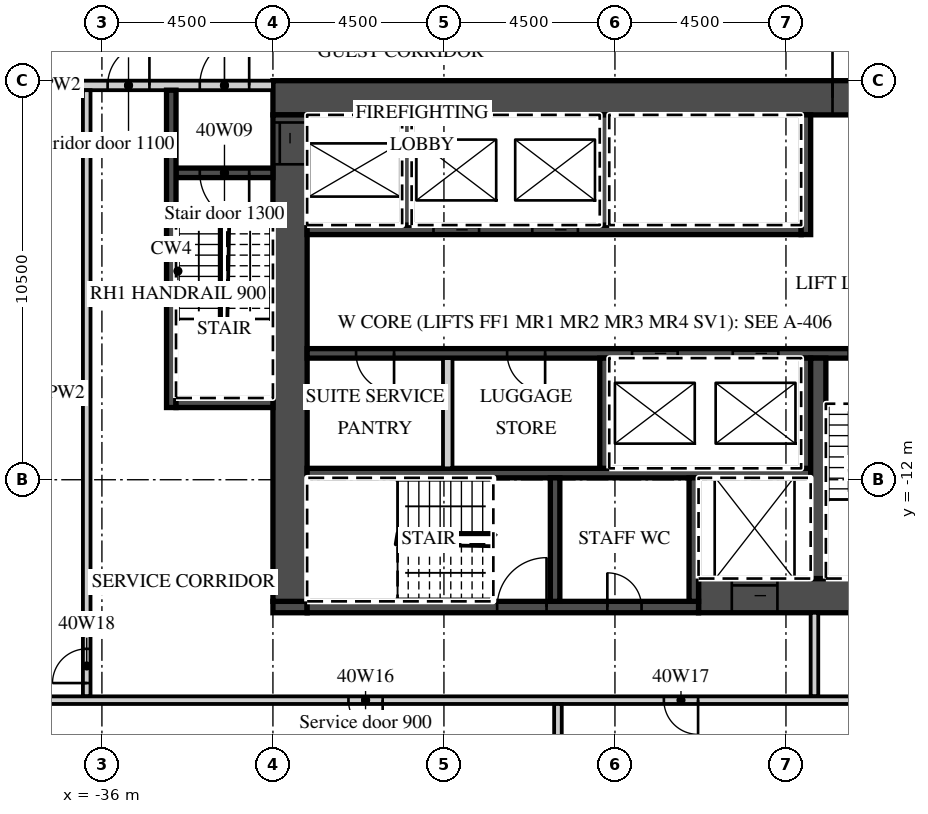
"""IFC4 building model, lengths in metres.
Left out: names, types, materials, properties, quantities, classifications, styles, units other than length and angle.
Written with IfcOpenShell. Run it as: python <this file> out.ifc"""

import sys

from ifc_helpers import new_model, si_unit, direction, frame, frame_2d, origin, place, context, subcontext, project, spatial, rectangle, extrude, element, fill, save


model = new_model("IFC4")
c1 = context("Model", 3, precision=1e-05, world=origin(), true_north=direction((0.0, 1.0)))
c2 = subcontext(c1, "Body", "Model", "MODEL_VIEW")
j1 = project(units=[si_unit("LENGTHUNIT", "METRE"), si_unit("PLANEANGLEUNIT", "RADIAN")], contexts=[c1])
p1 = place(None, origin())
s1 = spatial("IfcSite", under=j1, at=p1, CompositionType="ELEMENT")
p2 = place(p1, origin())
s2 = spatial("IfcBuilding", under=s1, at=p2, CompositionType="ELEMENT")
p3 = place(p2, frame((0.0, 0.0, 173.5)))
s3 = spatial("IfcBuildingStorey", under=s2, at=p3, CompositionType="ELEMENT", Elevation=173.5)
p4 = place(p3, frame((-31.5, -1.95, 0.0), z_axis=(0.0, 0.0, 1.0), x_axis=(1.0, 0.0, 0.0)))
e1 = element("IfcWall", 1, at=p4, inside=s3, PredefinedType="SHEAR", context=c2, shape_type="SweptSolid", body=[
    extrude(rectangle(XDim=18.0, YDim=0.9, at=frame_2d((9.0, 0.0))), origin(), (0.0, 0.0, 1.0), 3.02),
])
p5 = place(p4, frame((14.725, 0.0, 0.0)))
e2 = element("IfcOpeningElement", 2, at=p5, cuts=e1, PredefinedType="OPENING", context=c2, shape_type="SweptSolid", body=[
    extrude(rectangle(XDim=1.8, YDim=2.1, at=frame_2d((0.9, 1.05))), frame((0.0, 0.46, 0.0), z_axis=(0.0, -1.0, 0.0), x_axis=(1.0, 0.0, 0.0)), (0.0, 0.0, 1.0), 0.92),
])
p6 = place(p3, frame((-20.3, -15.05, 0.0), z_axis=(0.0, 0.0, 1.0), x_axis=(1.0, 0.0, 0.0)))
e3 = element("IfcWall", 3, at=p6, inside=s3, PredefinedType="SHEAR", context=c2, shape_type="SweptSolid", body=[
    extrude(rectangle(XDim=6.8, YDim=0.9, at=frame_2d((3.4, 0.0))), origin(), (0.0, 0.0, 1.0), 3.02),
])
p7 = place(p6, frame((0.875, 0.0, 0.0)))
e4 = element("IfcOpeningElement", 4, at=p7, cuts=e3, PredefinedType="OPENING", context=c2, shape_type="SweptSolid", body=[
    extrude(rectangle(XDim=1.2, YDim=2.1, at=frame_2d((0.6, 1.05))), frame((0.0, 0.46, 0.0), z_axis=(0.0, -1.0, 0.0), x_axis=(1.0, 0.0, 0.0)), (0.0, 0.0, 1.0), 0.92),
])
p8 = place(p3, frame((-31.5, -15.35, 0.0), z_axis=(0.0, 0.0, 1.0), x_axis=(1.0, 0.0, 0.0)))
e5 = element("IfcWall", 5, at=p8, inside=s3, PredefinedType="SHEAR", context=c2, shape_type="SweptSolid", body=[
    extrude(rectangle(XDim=0.9, YDim=0.3, at=frame_2d((0.45, 0.0))), origin(), (0.0, 0.0, 1.0), 3.02),
])
p9 = place(p3, frame((-30.6, -15.35, 0.0), z_axis=(0.0, 0.0, 1.0), x_axis=(1.0, 0.0, 0.0)))
e6 = element("IfcWall", 6, at=p9, inside=s3, PredefinedType="SHEAR", context=c2, shape_type="SweptSolid", body=[
    extrude(rectangle(XDim=10.3, YDim=0.3, at=frame_2d((5.15, 0.0))), origin(), (0.0, 0.0, 1.0), 3.02),
])
p10 = place(p9, frame((5.0, 0.0, 0.0)))
e7 = element("IfcOpeningElement", 7, at=p10, cuts=e6, PredefinedType="OPENING", context=c2, shape_type="SweptSolid", body=[
    extrude(rectangle(XDim=1.3, YDim=2.1, at=frame_2d((0.65, 1.05))), frame((0.0, 0.16, 0.0), z_axis=(0.0, -1.0, 0.0), x_axis=(1.0, 0.0, 0.0)), (0.0, 0.0, 1.0), 0.32),
])
p11 = place(p9, frame((7.9, 0.0, 0.0)))
e8 = element("IfcOpeningElement", 8, at=p11, cuts=e6, PredefinedType="OPENING", context=c2, shape_type="SweptSolid", body=[
    extrude(rectangle(XDim=0.9, YDim=2.1, at=frame_2d((0.45, 1.05))), frame((0.0, 0.16, 0.0), z_axis=(0.0, -1.0, 0.0), x_axis=(1.0, 0.0, 0.0)), (0.0, 0.0, 1.0), 0.32),
])
p12 = place(p3, frame((-31.05, -15.2, 0.0), z_axis=(0.0, 0.0, 1.0), x_axis=(0.0, 1.0, 0.0)))
e9 = element("IfcWall", 9, at=p12, inside=s3, PredefinedType="SHEAR", context=c2, shape_type="SweptSolid", body=[
    extrude(rectangle(XDim=12.8, YDim=0.9, at=frame_2d((6.4, 0.0))), origin(), (0.0, 0.0, 1.0), 3.02),
])
p13 = place(p12, frame((11.5, 0.0, 0.0)))
e10 = element("IfcOpeningElement", 10, at=p13, cuts=e9, PredefinedType="OPENING", context=c2, shape_type="SweptSolid", body=[
    extrude(rectangle(XDim=1.1, YDim=2.1, at=frame_2d((0.55, 1.05))), frame((0.0, 0.46, 0.0), z_axis=(0.0, -1.0, 0.0), x_axis=(1.0, 0.0, 0.0)), (0.0, 0.0, 1.0), 0.92),
])
p14 = place(p3, frame((-30.6, -5.425, 0.0), z_axis=(0.0, 0.0, 1.0), x_axis=(1.0, 0.0, 0.0)))
e11 = element("IfcWall", 11, at=p14, inside=s3, PredefinedType="SHEAR", context=c2, shape_type="SweptSolid", body=[
    extrude(rectangle(XDim=13.0, YDim=0.25, at=frame_2d((6.5, 0.0))), origin(), (0.0, 0.0, 1.0), 3.02),
])
p15 = place(p14, frame((3.325, 0.0, 0.0)))
e12 = element("IfcOpeningElement", 12, at=p15, cuts=e11, PredefinedType="OPENING", context=c2, shape_type="SweptSolid", body=[
    extrude(rectangle(XDim=1.2, YDim=2.1, at=frame_2d((0.6, 1.05))), frame((0.0, 0.135, 0.0), z_axis=(0.0, -1.0, 0.0), x_axis=(1.0, 0.0, 0.0)), (0.0, 0.0, 1.0), 0.27),
])
p16 = place(p14, frame((5.925, 0.0, 0.0)))
e13 = element("IfcOpeningElement", 13, at=p16, cuts=e11, PredefinedType="OPENING", context=c2, shape_type="SweptSolid", body=[
    extrude(rectangle(XDim=1.2, YDim=2.1, at=frame_2d((0.6, 1.05))), frame((0.0, 0.135, 0.0), z_axis=(0.0, -1.0, 0.0), x_axis=(1.0, 0.0, 0.0)), (0.0, 0.0, 1.0), 0.27),
])
p17 = place(p3, frame((-17.475, -5.55, 0.0), z_axis=(0.0, 0.0, 1.0), x_axis=(0.0, 1.0, 0.0)))
e14 = element("IfcWall", 14, at=p17, inside=s3, PredefinedType="SHEAR", context=c2, shape_type="SweptSolid", body=[
    extrude(rectangle(XDim=3.15, YDim=0.25, at=frame_2d((1.575, 0.0))), origin(), (0.0, 0.0, 1.0), 3.02),
])
for number, where, z_axis, x_axis in (
    (15, (-27.975, -5.3, 0.0), (0.0, 0.0, 1.0), (0.0, 1.0, 0.0)),
    (16, (-22.775, -5.3, 0.0), (0.0, 0.0, 1.0), (0.0, 1.0, 0.0)),
):
    element("IfcWall", number, at=place(p3, frame(where, z_axis=z_axis, x_axis=x_axis)), inside=s3, PredefinedType="SHEAR", context=c2, shape_type="SweptSolid", body=[
        extrude(rectangle(XDim=2.9, YDim=0.25, at=frame_2d((1.45, 0.0))), origin(), (0.0, 0.0, 1.0), 3.02),
    ])
p18 = place(p3, frame((-30.6, -8.675, 0.0), z_axis=(0.0, 0.0, 1.0), x_axis=(1.0, 0.0, 0.0)))
e17 = element("IfcWall", 17, at=p18, inside=s3, PredefinedType="SHEAR", context=c2, shape_type="SweptSolid", body=[
    extrude(rectangle(XDim=16.2, YDim=0.25, at=frame_2d((8.1, 0.0))), origin(), (0.0, 0.0, 1.0), 3.02),
])
p19 = place(p18, frame((8.55, 0.0, 0.0)))
e18 = element("IfcOpeningElement", 18, at=p19, cuts=e17, PredefinedType="OPENING", context=c2, shape_type="SweptSolid", body=[
    extrude(rectangle(XDim=1.2, YDim=2.1, at=frame_2d((0.6, 1.05))), frame((0.0, 0.135, 0.0), z_axis=(0.0, -1.0, 0.0), x_axis=(1.0, 0.0, 0.0)), (0.0, 0.0, 1.0), 0.27),
])
p20 = place(p18, frame((11.2, 0.0, 0.0)))
e19 = element("IfcOpeningElement", 19, at=p20, cuts=e17, PredefinedType="OPENING", context=c2, shape_type="SweptSolid", body=[
    extrude(rectangle(XDim=1.2, YDim=2.1, at=frame_2d((0.6, 1.05))), frame((0.0, 0.135, 0.0), z_axis=(0.0, -1.0, 0.0), x_axis=(1.0, 0.0, 0.0)), (0.0, 0.0, 1.0), 0.27),
])
p21 = place(p18, frame((14.25, 0.0, 0.0)))
e20 = element("IfcOpeningElement", 20, at=p21, cuts=e17, PredefinedType="OPENING", context=c2, shape_type="SweptSolid", body=[
    extrude(rectangle(XDim=1.3, YDim=2.1, at=frame_2d((0.65, 1.05))), frame((0.0, 0.135, 0.0), z_axis=(0.0, -1.0, 0.0), x_axis=(1.0, 0.0, 0.0)), (0.0, 0.0, 1.0), 0.27),
])
p22 = place(p18, frame((1.288, 0.0, 0.0)))
e21 = element("IfcOpeningElement", 21, at=p22, cuts=e17, PredefinedType="OPENING", context=c2, shape_type="SweptSolid", body=[
    extrude(rectangle(XDim=1.0, YDim=2.1, at=frame_2d((0.5, 1.05))), frame((0.0, 0.135, 0.0), z_axis=(0.0, -1.0, 0.0), x_axis=(1.0, 0.0, 0.0)), (0.0, 0.0, 1.0), 0.27),
])
p23 = place(p18, frame((5.262, 0.0, 0.0)))
e22 = element("IfcOpeningElement", 22, at=p23, cuts=e17, PredefinedType="OPENING", context=c2, shape_type="SweptSolid", body=[
    extrude(rectangle(XDim=1.0, YDim=2.1, at=frame_2d((0.5, 1.05))), frame((0.0, 0.135, 0.0), z_axis=(0.0, -1.0, 0.0), x_axis=(1.0, 0.0, 0.0)), (0.0, 0.0, 1.0), 0.27),
])
p24 = place(p3, frame((-30.6, -11.825, 0.0), z_axis=(0.0, 0.0, 1.0), x_axis=(1.0, 0.0, 0.0)))
e23 = element("IfcWall", 23, at=p24, inside=s3, PredefinedType="SHEAR", context=c2, shape_type="SweptSolid", body=[
    extrude(rectangle(XDim=13.25, YDim=0.25, at=frame_2d((6.625, 0.0))), origin(), (0.0, 0.0, 1.0), 3.02),
])
for number, where, z_axis, x_axis in (
    (24, (-17.475, -11.7, 0.0), (0.0, 0.0, 1.0), (0.0, 1.0, 0.0)),
    (25, (-22.775, -11.7, 0.0), (0.0, 0.0, 1.0), (0.0, 1.0, 0.0)),
):
    element("IfcWall", number, at=place(p3, frame(where, z_axis=z_axis, x_axis=x_axis)), inside=s3, PredefinedType="SHEAR", context=c2, shape_type="SweptSolid", body=[
        extrude(rectangle(XDim=2.9, YDim=0.25, at=frame_2d((1.45, 0.0))), origin(), (0.0, 0.0, 1.0), 3.02),
    ])
p25 = place(p3, frame((-26.9, -11.7, 0.0), z_axis=(0.0, 0.0, 1.0), x_axis=(0.0, 1.0, 0.0)))
e26 = element("IfcWall", 26, at=p25, inside=s3, PredefinedType="PARTITIONING", context=c2, shape_type="SweptSolid", body=[
    extrude(rectangle(XDim=2.9, YDim=0.25, at=frame_2d((1.45, 0.0))), origin(), (0.0, 0.0, 1.0), 3.02),
])
p26 = place(p3, frame((-17.15, -14.6, 0.0), z_axis=(0.0, 0.0, 1.0), x_axis=(0.0, 1.0, 0.0)))
e27 = element("IfcWall", 27, at=p26, inside=s3, PredefinedType="SHEAR", context=c2, shape_type="SweptSolid", body=[
    extrude(rectangle(XDim=5.8, YDim=0.4, at=frame_2d((2.9, 0.0))), origin(), (0.0, 0.0, 1.0), 3.02),
])
for number, where, z_axis, x_axis in (
    (28, (-20.425, -15.2, 0.0), (0.0, 0.0, 1.0), (0.0, 1.0, 0.0)),
    (29, (-24.075, -15.2, 0.0), (0.0, 0.0, 1.0), (0.0, 1.0, 0.0)),
):
    element("IfcWall", number, at=place(p3, frame(where, z_axis=z_axis, x_axis=x_axis)), inside=s3, PredefinedType="SHEAR", context=c2, shape_type="SweptSolid", body=[
        extrude(rectangle(XDim=3.25, YDim=0.25, at=frame_2d((1.625, 0.0))), origin(), (0.0, 0.0, 1.0), 3.02),
    ])
p27 = place(p3, frame((-42.632, -1.625, 0.0), z_axis=(0.0, 0.0, 1.0), x_axis=(1.0, 0.0, 0.0)))
e30 = element("IfcWall", 30, at=p27, inside=s3, PredefinedType="PARTITIONING", context=c2, shape_type="SweptSolid", body=[
    extrude(rectangle(XDim=11.132, YDim=0.25, at=frame_2d((5.566, 0.0))), origin(), (0.0, 0.0, 1.0), 3.02),
])
p28 = place(p27, frame((9.207, 0.0, 0.0)))
e31 = element("IfcOpeningElement", 31, at=p28, cuts=e30, PredefinedType="OPENING", context=c2, shape_type="SweptSolid", body=[
    extrude(rectangle(XDim=1.3, YDim=2.1, at=frame_2d((0.65, 1.05))), frame((0.0, 0.135, 0.0), z_axis=(0.0, -1.0, 0.0), x_axis=(1.0, 0.0, 0.0)), (0.0, 0.0, 1.0), 0.27),
])
p29 = place(p27, frame((6.781, 0.0, 0.0)))
e32 = element("IfcOpeningElement", 32, at=p29, cuts=e30, PredefinedType="OPENING", context=c2, shape_type="SweptSolid", body=[
    extrude(rectangle(XDim=1.1, YDim=2.1, at=frame_2d((0.55, 1.05))), frame((0.0, 0.135, 0.0), z_axis=(0.0, -1.0, 0.0), x_axis=(1.0, 0.0, 0.0)), (0.0, 0.0, 1.0), 0.27),
])
p30 = place(p3, frame((-34.05, -3.925, 0.0), z_axis=(0.0, 0.0, 1.0), x_axis=(1.0, 0.0, 0.0)))
e33 = element("IfcWall", 33, at=p30, inside=s3, PredefinedType="SHEAR", context=c2, shape_type="SweptSolid", body=[
    extrude(rectangle(XDim=2.55, YDim=0.25, at=frame_2d((1.275, 0.0))), origin(), (0.0, 0.0, 1.0), 3.02),
])
p31 = place(p30, frame((0.625, 0.0, 0.0)))
e34 = element("IfcOpeningElement", 34, at=p31, cuts=e33, PredefinedType="OPENING", context=c2, shape_type="SweptSolid", body=[
    extrude(rectangle(XDim=1.3, YDim=2.1, at=frame_2d((0.65, 1.05))), frame((0.0, 0.135, 0.0), z_axis=(0.0, -1.0, 0.0), x_axis=(1.0, 0.0, 0.0)), (0.0, 0.0, 1.0), 0.27),
])
p32 = place(p3, frame((-34.175, -10.1, 0.0), z_axis=(0.0, 0.0, 1.0), x_axis=(0.0, 1.0, 0.0)))
e35 = element("IfcWall", 35, at=p32, inside=s3, PredefinedType="SHEAR", context=c2, shape_type="SweptSolid", body=[
    extrude(rectangle(XDim=8.35, YDim=0.25, at=frame_2d((4.175, 0.0))), origin(), (0.0, 0.0, 1.0), 3.02),
])
p33 = place(p3, frame((-34.05, -9.975, 0.0), z_axis=(0.0, 0.0, 1.0), x_axis=(1.0, 0.0, 0.0)))
e36 = element("IfcWall", 36, at=p33, inside=s3, PredefinedType="SHEAR", context=c2, shape_type="SweptSolid", body=[
    extrude(rectangle(XDim=2.55, YDim=0.25, at=frame_2d((1.275, 0.0))), origin(), (0.0, 0.0, 1.0), 3.02),
])
p34 = place(p3, frame((-17.25, -17.7, 0.0), z_axis=(0.0, 0.0, 1.0), x_axis=(0.0, 1.0, 0.0)))
e37 = element("IfcWall", 37, at=p34, inside=s3, PredefinedType="PARTITIONING", context=c2, shape_type="SweptSolid", body=[
    extrude(rectangle(XDim=2.2, YDim=0.2, at=frame_2d((1.1, 0.0))), origin(), (0.0, 0.0, 1.0), 3.02),
])
p35 = place(p3, frame((-36.4, -17.7, 0.0), z_axis=(0.0, 0.0, 1.0), x_axis=(0.0, 1.0, 0.0)))
e38 = element("IfcWall", 38, at=p35, inside=s3, PredefinedType="PARTITIONING", context=c2, shape_type="SweptSolid", body=[
    extrude(rectangle(XDim=15.95, YDim=0.2, at=frame_2d((7.975, 0.0))), origin(), (0.0, 0.0, 1.0), 3.02),
])
p36 = place(p35, frame((0.35, 0.0, 0.0)))
e39 = element("IfcOpeningElement", 39, at=p36, cuts=e38, PredefinedType="OPENING", context=c2, shape_type="SweptSolid", body=[
    extrude(rectangle(XDim=0.9, YDim=2.1, at=frame_2d((0.45, 1.05))), frame((0.0, 0.11, 0.0), z_axis=(0.0, -1.0, 0.0), x_axis=(1.0, 0.0, 0.0)), (0.0, 0.0, 1.0), 0.22),
])
p37 = place(p3, frame((-41.074, -17.8, 0.0), z_axis=(0.0, 0.0, 1.0), x_axis=(1.0, 0.0, 0.0)))
e40 = element("IfcWall", 40, at=p37, inside=s3, PredefinedType="PARTITIONING", context=c2, shape_type="SweptSolid", body=[
    extrude(rectangle(XDim=27.474, YDim=0.2, at=frame_2d((13.737, 0.0))), origin(), (0.0, 0.0, 1.0), 3.02),
])
p38 = place(p37, frame((11.562, 0.0, 0.0)))
e41 = element("IfcOpeningElement", 41, at=p38, cuts=e40, PredefinedType="OPENING", context=c2, shape_type="SweptSolid", body=[
    extrude(rectangle(XDim=0.9, YDim=2.1, at=frame_2d((0.45, 1.05))), frame((0.0, 0.11, 0.0), z_axis=(0.0, -1.0, 0.0), x_axis=(1.0, 0.0, 0.0)), (0.0, 0.0, 1.0), 0.22),
])
p39 = place(p37, frame((19.862, 0.0, 0.0)))
e42 = element("IfcOpeningElement", 42, at=p39, cuts=e40, PredefinedType="OPENING", context=c2, shape_type="SweptSolid", body=[
    extrude(rectangle(XDim=0.9, YDim=2.1, at=frame_2d((0.45, 1.05))), frame((0.0, 0.11, 0.0), z_axis=(0.0, -1.0, 0.0), x_axis=(1.0, 0.0, 0.0)), (0.0, 0.0, 1.0), 0.22),
])
p40 = place(p3, frame((-24.0, -23.312, 0.0), z_axis=(0.0, 0.0, 1.0), x_axis=(0.0, 1.0, 0.0)))
e43 = element("IfcWall", 43, at=p40, inside=s3, PredefinedType="PARTITIONING", context=c2, shape_type="SweptSolid", body=[
    extrude(rectangle(XDim=5.413, YDim=0.2, at=frame_2d((2.706, 0.0))), origin(), (0.0, 0.0, 1.0), 3.02),
])
p41 = place(p19, origin())
e44 = element("IfcDoor", 44, at=p41, inside=s3, OperationType="SLIDING_TO_LEFT", PredefinedType="DOOR", context=c2, shape_type="SweptSolid", body=[
    extrude(rectangle(XDim=1.2, YDim=2.1, at=frame_2d((0.6, 1.05))), frame((0.0, 0.025, 0.0), z_axis=(0.0, -1.0, 0.0), x_axis=(1.0, 0.0, 0.0)), (0.0, 0.0, 1.0), 0.05),
])
fill(e18, e44)
p42 = place(p20, origin())
e45 = element("IfcDoor", 45, at=p42, inside=s3, OperationType="SLIDING_TO_RIGHT", PredefinedType="DOOR", context=c2, shape_type="SweptSolid", body=[
    extrude(rectangle(XDim=1.2, YDim=2.1, at=frame_2d((0.6, 1.05))), frame((0.0, 0.025, 0.0), z_axis=(0.0, -1.0, 0.0), x_axis=(1.0, 0.0, 0.0)), (0.0, 0.0, 1.0), 0.05),
])
fill(e19, e45)
p43 = place(p15, origin())
e46 = element("IfcDoor", 46, at=p43, inside=s3, OperationType="SLIDING_TO_RIGHT", PredefinedType="DOOR", context=c2, shape_type="SweptSolid", body=[
    extrude(rectangle(XDim=1.2, YDim=2.1, at=frame_2d((0.6, 1.05))), frame((0.0, 0.025, 0.0), z_axis=(0.0, -1.0, 0.0), x_axis=(1.0, 0.0, 0.0)), (0.0, 0.0, 1.0), 0.05),
])
fill(e12, e46)
p44 = place(p16, origin())
e47 = element("IfcDoor", 47, at=p44, inside=s3, OperationType="SLIDING_TO_RIGHT", PredefinedType="DOOR", context=c2, shape_type="SweptSolid", body=[
    extrude(rectangle(XDim=1.2, YDim=2.1, at=frame_2d((0.6, 1.05))), frame((0.0, 0.025, 0.0), z_axis=(0.0, -1.0, 0.0), x_axis=(1.0, 0.0, 0.0)), (0.0, 0.0, 1.0), 0.05),
])
fill(e13, e47)
p45 = place(p7, origin())
e48 = element("IfcDoor", 48, at=p45, inside=s3, OperationType="SLIDING_TO_LEFT", PredefinedType="DOOR", context=c2, shape_type="SweptSolid", body=[
    extrude(rectangle(XDim=1.2, YDim=2.1, at=frame_2d((0.6, 1.05))), frame((0.0, 0.025, 0.0), z_axis=(0.0, -1.0, 0.0), x_axis=(1.0, 0.0, 0.0)), (0.0, 0.0, 1.0), 0.05),
])
fill(e4, e48)
p46 = place(p13, origin())
e49 = element("IfcDoor", 49, at=p46, inside=s3, OperationType="SLIDING_TO_RIGHT", PredefinedType="DOOR", context=c2, shape_type="SweptSolid", body=[
    extrude(rectangle(XDim=1.1, YDim=2.1, at=frame_2d((0.55, 1.05))), frame((0.0, 0.025, 0.0), z_axis=(0.0, -1.0, 0.0), x_axis=(1.0, 0.0, 0.0)), (0.0, 0.0, 1.0), 0.05),
])
fill(e10, e49)
p47 = place(p5, origin())
e50 = element("IfcDoor", 50, at=p47, inside=s3, OperationType="DOUBLE_DOOR_DOUBLE_SWING", PredefinedType="DOOR", context=c2, shape_type="SweptSolid", body=[
    extrude(rectangle(XDim=1.8, YDim=2.1, at=frame_2d((0.9, 1.05))), frame((0.0, 0.025, 0.0), z_axis=(0.0, -1.0, 0.0), x_axis=(1.0, 0.0, 0.0)), (0.0, 0.0, 1.0), 0.05),
])
fill(e2, e50)
p48 = place(p28, origin())
e51 = element("IfcDoor", 51, at=p48, inside=s3, OperationType="SINGLE_SWING_RIGHT", PredefinedType="DOOR", context=c2, shape_type="SweptSolid", body=[
    extrude(rectangle(XDim=1.3, YDim=2.1, at=frame_2d((0.65, 1.05))), frame((0.0, 0.025, 0.0), z_axis=(0.0, -1.0, 0.0), x_axis=(1.0, 0.0, 0.0)), (0.0, 0.0, 1.0), 0.05),
])
fill(e31, e51)
p49 = place(p31, origin())
e52 = element("IfcDoor", 52, at=p49, inside=s3, OperationType="SINGLE_SWING_RIGHT", PredefinedType="DOOR", context=c2, shape_type="SweptSolid", body=[
    extrude(rectangle(XDim=1.3, YDim=2.1, at=frame_2d((0.65, 1.05))), frame((0.0, 0.025, 0.0), z_axis=(0.0, -1.0, 0.0), x_axis=(1.0, 0.0, 0.0)), (0.0, 0.0, 1.0), 0.05),
])
fill(e34, e52)
p50 = place(p29, origin())
e53 = element("IfcDoor", 53, at=p50, inside=s3, OperationType="SINGLE_SWING_RIGHT", PredefinedType="DOOR", context=c2, shape_type="SweptSolid", body=[
    extrude(rectangle(XDim=1.1, YDim=2.1, at=frame_2d((0.55, 1.05))), frame((0.0, 0.025, 0.0), z_axis=(0.0, -1.0, 0.0), x_axis=(1.0, 0.0, 0.0)), (0.0, 0.0, 1.0), 0.05),
])
fill(e32, e53)
p51 = place(p21, origin())
e54 = element("IfcDoor", 54, at=p51, inside=s3, OperationType="SINGLE_SWING_RIGHT", PredefinedType="DOOR", context=c2, shape_type="SweptSolid", body=[
    extrude(rectangle(XDim=1.3, YDim=2.1, at=frame_2d((0.65, 1.05))), frame((0.0, 0.025, 0.0), z_axis=(0.0, -1.0, 0.0), x_axis=(1.0, 0.0, 0.0)), (0.0, 0.0, 1.0), 0.05),
])
fill(e20, e54)
p52 = place(p10, origin())
e55 = element("IfcDoor", 55, at=p52, inside=s3, OperationType="SINGLE_SWING_RIGHT", PredefinedType="DOOR", context=c2, shape_type="SweptSolid", body=[
    extrude(rectangle(XDim=1.3, YDim=2.1, at=frame_2d((0.65, 1.05))), frame((0.0, 0.025, 0.0), z_axis=(0.0, -1.0, 0.0), x_axis=(1.0, 0.0, 0.0)), (0.0, 0.0, 1.0), 0.05),
])
fill(e7, e55)
p53 = place(p11, origin())
e56 = element("IfcDoor", 56, at=p53, inside=s3, OperationType="SINGLE_SWING_LEFT", PredefinedType="DOOR", context=c2, shape_type="SweptSolid", body=[
    extrude(rectangle(XDim=0.9, YDim=2.1, at=frame_2d((0.45, 1.05))), frame((0.0, 0.025, 0.0), z_axis=(0.0, -1.0, 0.0), x_axis=(1.0, 0.0, 0.0)), (0.0, 0.0, 1.0), 0.05),
])
fill(e8, e56)
p54 = place(p22, origin())
e57 = element("IfcDoor", 57, at=p54, inside=s3, OperationType="SINGLE_SWING_RIGHT", PredefinedType="DOOR", context=c2, shape_type="SweptSolid", body=[
    extrude(rectangle(XDim=1.0, YDim=2.1, at=frame_2d((0.5, 1.05))), frame((0.0, 0.025, 0.0), z_axis=(0.0, -1.0, 0.0), x_axis=(1.0, 0.0, 0.0)), (0.0, 0.0, 1.0), 0.05),
])
fill(e21, e57)
p55 = place(p23, origin())
e58 = element("IfcDoor", 58, at=p55, inside=s3, OperationType="SINGLE_SWING_RIGHT", PredefinedType="DOOR", context=c2, shape_type="SweptSolid", body=[
    extrude(rectangle(XDim=1.0, YDim=2.1, at=frame_2d((0.5, 1.05))), frame((0.0, 0.025, 0.0), z_axis=(0.0, -1.0, 0.0), x_axis=(1.0, 0.0, 0.0)), (0.0, 0.0, 1.0), 0.05),
])
fill(e22, e58)
p56 = place(p38, origin())
e59 = element("IfcDoor", 59, at=p56, inside=s3, OperationType="SINGLE_SWING_RIGHT", PredefinedType="DOOR", context=c2, shape_type="SweptSolid", body=[
    extrude(rectangle(XDim=0.9, YDim=2.1, at=frame_2d((0.45, 1.05))), frame((0.0, 0.025, 0.0), z_axis=(0.0, -1.0, 0.0), x_axis=(1.0, 0.0, 0.0)), (0.0, 0.0, 1.0), 0.05),
])
fill(e41, e59)
p57 = place(p39, origin())
e60 = element("IfcDoor", 60, at=p57, inside=s3, OperationType="SINGLE_SWING_RIGHT", PredefinedType="DOOR", context=c2, shape_type="SweptSolid", body=[
    extrude(rectangle(XDim=0.9, YDim=2.1, at=frame_2d((0.45, 1.05))), frame((0.0, 0.025, 0.0), z_axis=(0.0, -1.0, 0.0), x_axis=(1.0, 0.0, 0.0)), (0.0, 0.0, 1.0), 0.05),
])
fill(e42, e60)
p58 = place(p36, origin())
e61 = element("IfcDoor", 61, at=p58, inside=s3, OperationType="SINGLE_SWING_LEFT", PredefinedType="DOOR", context=c2, shape_type="SweptSolid", body=[
    extrude(rectangle(XDim=0.9, YDim=2.1, at=frame_2d((0.45, 1.05))), frame((0.0, 0.025, 0.0), z_axis=(0.0, -1.0, 0.0), x_axis=(1.0, 0.0, 0.0)), (0.0, 0.0, 1.0), 0.05),
])
fill(e39, e61)
save(model, sys.argv[1])
